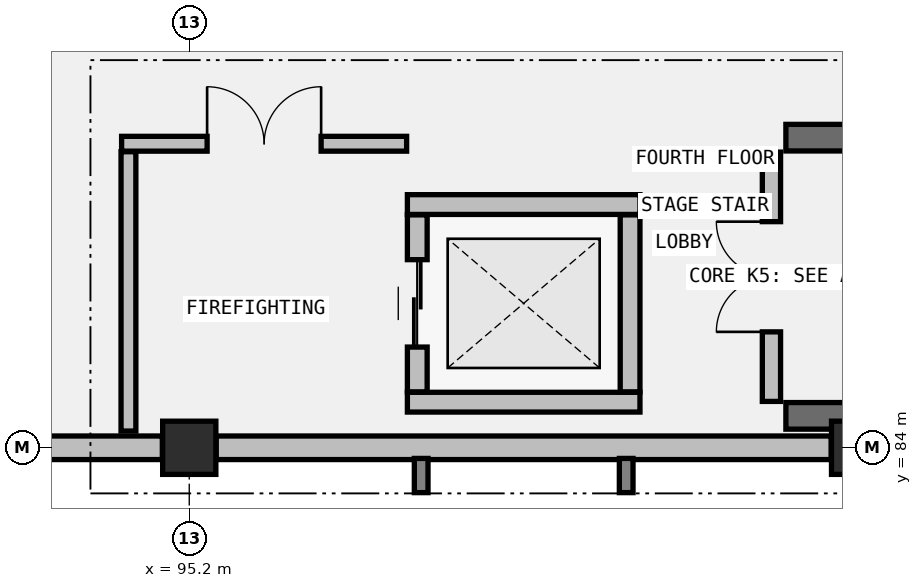
"""IFC4 building model, lengths in metres.
Left out: names, types, materials, properties, quantities, classifications, styles, units other than length and angle.
Written with IfcOpenShell. Run it as: python <this file> out.ifc"""

import sys

from ifc_helpers import new_model, si_unit, direction, frame, frame_2d, origin, origin_2d, place, context, subcontext, project, spatial, rectangle, extrude, element, fill, save


model = new_model("IFC4")
c1 = context("Model", 3, precision=1e-05, world=origin(), true_north=direction((0.0, 1.0)))
c2 = subcontext(c1, "Body", "Model", "MODEL_VIEW")
j1 = project(units=[si_unit("LENGTHUNIT", "METRE"), si_unit("PLANEANGLEUNIT", "RADIAN")], contexts=[c1])
p1 = place(None, origin())
s1 = spatial("IfcSite", under=j1, at=p1, CompositionType="ELEMENT")
p2 = place(p1, origin())
s2 = spatial("IfcBuilding", under=s1, at=p2, CompositionType="ELEMENT")
p3 = place(p2, frame((0.0, 0.0, 19.2)))
s3 = spatial("IfcBuildingStorey", under=s2, at=p3, CompositionType="ELEMENT", Elevation=19.2)
for number, where, z_axis, x_axis in (
    (1, (95.2, 84.0, 0.0), (0.0, 0.0, 1.0), (1.0, 0.0, 0.0)),
    (2, (104.0, 84.0, 0.0), (0.0, 0.0, 1.0), (1.0, 0.0, 0.0)),
):
    element("IfcColumn", number, at=place(p3, frame(where, z_axis=z_axis, x_axis=x_axis)), inside=s3, PredefinedType="COLUMN", context=c2, shape_type="SweptSolid", body=[
        extrude(rectangle(XDim=0.7, YDim=0.7, at=origin_2d()), origin(), (0.0, 0.0, 1.0), 4.6),
    ])
for number, where, z_axis, x_axis in (
    (3, (103.05, 84.42, 0.0), (0.0, 0.0, 1.0), (1.0, 0.0, 0.0)),
    (4, (111.2, 88.08, 0.0), (0.0, 0.0, 1.0), (-1.0, 0.0, 0.0)),
):
    element("IfcWall", number, at=place(p3, frame(where, z_axis=z_axis, x_axis=x_axis)), inside=s3, PredefinedType="SHEAR", context=c2, shape_type="SweptSolid", body=[
        extrude(rectangle(XDim=8.15, YDim=0.35, at=frame_2d((4.075, 0.0))), origin(), (0.0, 0.0, 1.0), 4.34),
    ])
p4 = place(p3, frame((86.804, 84.0, 0.0), z_axis=(0.0, 0.0, 1.0), x_axis=(1.0, 0.0, 0.0)))
e5 = element("IfcWall", 5, at=p4, inside=s3, PredefinedType="STANDARD", context=c2, shape_type="SweptSolid", body=[
    extrude(rectangle(XDim=8.042, YDim=0.31, at=frame_2d((4.021, 0.0))), origin(), (0.0, 0.0, 1.0), 3.518),
])
p5 = place(p3, frame((95.554, 84.0, 0.0), z_axis=(0.0, 0.0, 1.0), x_axis=(1.0, 0.0, 0.0)))
e6 = element("IfcWall", 6, at=p5, inside=s3, PredefinedType="STANDARD", context=c2, shape_type="SweptSolid", body=[
    extrude(rectangle(XDim=8.092, YDim=0.31, at=frame_2d((4.046, 0.0))), origin(), (0.0, 0.0, 1.0), 3.518),
])
p6 = place(p3, frame((102.86, 84.61, 0.0), z_axis=(0.0, 0.0, 1.0), x_axis=(0.0, 1.0, 0.0)))
e7 = element("IfcWall", 7, at=p6, inside=s3, PredefinedType="STANDARD", context=c2, shape_type="SweptSolid", body=[
    extrude(rectangle(XDim=3.28, YDim=0.24, at=frame_2d((1.64, 0.0))), origin(), (0.0, 0.0, 1.0), 4.34),
])
p7 = place(p6, frame((0.915, 0.0, 0.0)))
e8 = element("IfcOpeningElement", 8, at=p7, cuts=e7, PredefinedType="OPENING", context=c2, shape_type="SweptSolid", body=[
    extrude(rectangle(XDim=1.45, YDim=2.2, at=frame_2d((0.725, 1.1))), frame((0.0, 0.13, 0.0), z_axis=(0.0, -1.0, 0.0), x_axis=(1.0, 0.0, 0.0)), (0.0, 0.0, 1.0), 0.26),
])
for number, where, z_axis, x_axis in (
    (9, (98.07, 84.6, 0.0), (0.0, 0.0, 1.0), (1.0, 0.0, 0.0)),
    (10, (98.07, 87.2, 0.0), (0.0, 0.0, 1.0), (1.0, 0.0, 0.0)),
):
    element("IfcWall", number, at=place(p3, frame(where, z_axis=z_axis, x_axis=x_axis)), inside=s3, PredefinedType="STANDARD", context=c2, shape_type="SweptSolid", body=[
        extrude(rectangle(XDim=3.06, YDim=0.26, at=frame_2d((1.53, 0.0))), origin(), (0.0, 0.0, 1.0), 4.34),
    ])
p8 = place(p3, frame((98.2, 84.736, 0.0), z_axis=(0.0, 0.0, 1.0), x_axis=(0.0, 1.0, 0.0)))
e11 = element("IfcWall", 11, at=p8, inside=s3, PredefinedType="STANDARD", context=c2, shape_type="SweptSolid", body=[
    extrude(rectangle(XDim=2.328, YDim=0.26, at=frame_2d((1.164, 0.0))), origin(), (0.0, 0.0, 1.0), 4.34),
])
p9 = place(p8, frame((0.589, 0.0, 0.0)))
e12 = element("IfcOpeningElement", 12, at=p9, cuts=e11, PredefinedType="OPENING", context=c2, shape_type="SweptSolid", body=[
    extrude(rectangle(XDim=1.15, YDim=2.15, at=frame_2d((0.575, 1.075))), frame((0.0, 0.14, 0.0), z_axis=(0.0, -1.0, 0.0), x_axis=(1.0, 0.0, 0.0)), (0.0, 0.0, 1.0), 0.28),
])
p10 = place(p3, frame((101.0, 84.736, 0.0), z_axis=(0.0, 0.0, 1.0), x_axis=(0.0, 1.0, 0.0)))
e13 = element("IfcWall", 13, at=p10, inside=s3, PredefinedType="STANDARD", context=c2, shape_type="SweptSolid", body=[
    extrude(rectangle(XDim=2.328, YDim=0.26, at=frame_2d((1.164, 0.0))), origin(), (0.0, 0.0, 1.0), 4.34),
])
p11 = place(p3, frame((94.4, 84.22, 0.0), z_axis=(0.0, 0.0, 1.0), x_axis=(0.0, 1.0, 0.0)))
e14 = element("IfcWall", 14, at=p11, inside=s3, PredefinedType="PARTITIONING", context=c2, shape_type="SweptSolid", body=[
    extrude(rectangle(XDim=3.675, YDim=0.195, at=frame_2d((1.837, 0.0))), origin(), (0.0, 0.0, 1.0), 3.518),
])
p12 = place(p3, frame((94.31, 88.0, 0.0), z_axis=(0.0, 0.0, 1.0), x_axis=(1.0, 0.0, 0.0)))
e15 = element("IfcWall", 15, at=p12, inside=s3, PredefinedType="PARTITIONING", context=c2, shape_type="SweptSolid", body=[
    extrude(rectangle(XDim=3.75, YDim=0.195, at=frame_2d((1.875, 0.0))), origin(), (0.0, 0.0, 1.0), 4.34),
])
p13 = place(p12, frame((1.125, 0.0, 0.0)))
e16 = element("IfcOpeningElement", 16, at=p13, cuts=e15, PredefinedType="OPENING", context=c2, shape_type="SweptSolid", body=[
    extrude(rectangle(XDim=1.5, YDim=2.2, at=frame_2d((0.75, 1.1))), frame((0.0, 0.107, 0.0), z_axis=(0.0, -1.0, 0.0), x_axis=(1.0, 0.0, 0.0)), (0.0, 0.0, 1.0), 0.215),
])
p14 = place(p7, origin())
e17 = element("IfcDoor", 17, at=p14, inside=s3, OperationType="DOUBLE_DOOR_SINGLE_SWING", PredefinedType="DOOR", context=c2, shape_type="SweptSolid", body=[
    extrude(rectangle(XDim=1.45, YDim=2.2, at=frame_2d((0.725, 1.1))), frame((0.0, 0.025, 0.0), z_axis=(0.0, -1.0, 0.0), x_axis=(1.0, 0.0, 0.0)), (0.0, 0.0, 1.0), 0.05),
])
fill(e8, e17)
p15 = place(p9, origin())
e18 = element("IfcDoor", 18, at=p15, inside=s3, OperationType="SLIDING_TO_LEFT", PredefinedType="DOOR", context=c2, shape_type="SweptSolid", body=[
    extrude(rectangle(XDim=1.15, YDim=2.15, at=frame_2d((0.575, 1.075))), frame((0.0, 0.025, 0.0), z_axis=(0.0, -1.0, 0.0), x_axis=(1.0, 0.0, 0.0)), (0.0, 0.0, 1.0), 0.05),
])
fill(e12, e18)
p16 = place(p13, origin())
e19 = element("IfcDoor", 19, at=p16, inside=s3, OperationType="DOUBLE_DOOR_SINGLE_SWING", PredefinedType="DOOR", context=c2, shape_type="SweptSolid", body=[
    extrude(rectangle(XDim=1.5, YDim=2.2, at=frame_2d((0.75, 1.1))), frame((0.0, 0.025, 0.0), z_axis=(0.0, -1.0, 0.0), x_axis=(1.0, 0.0, 0.0)), (0.0, 0.0, 1.0), 0.05),
])
fill(e16, e19)
save(model, sys.argv[1])
